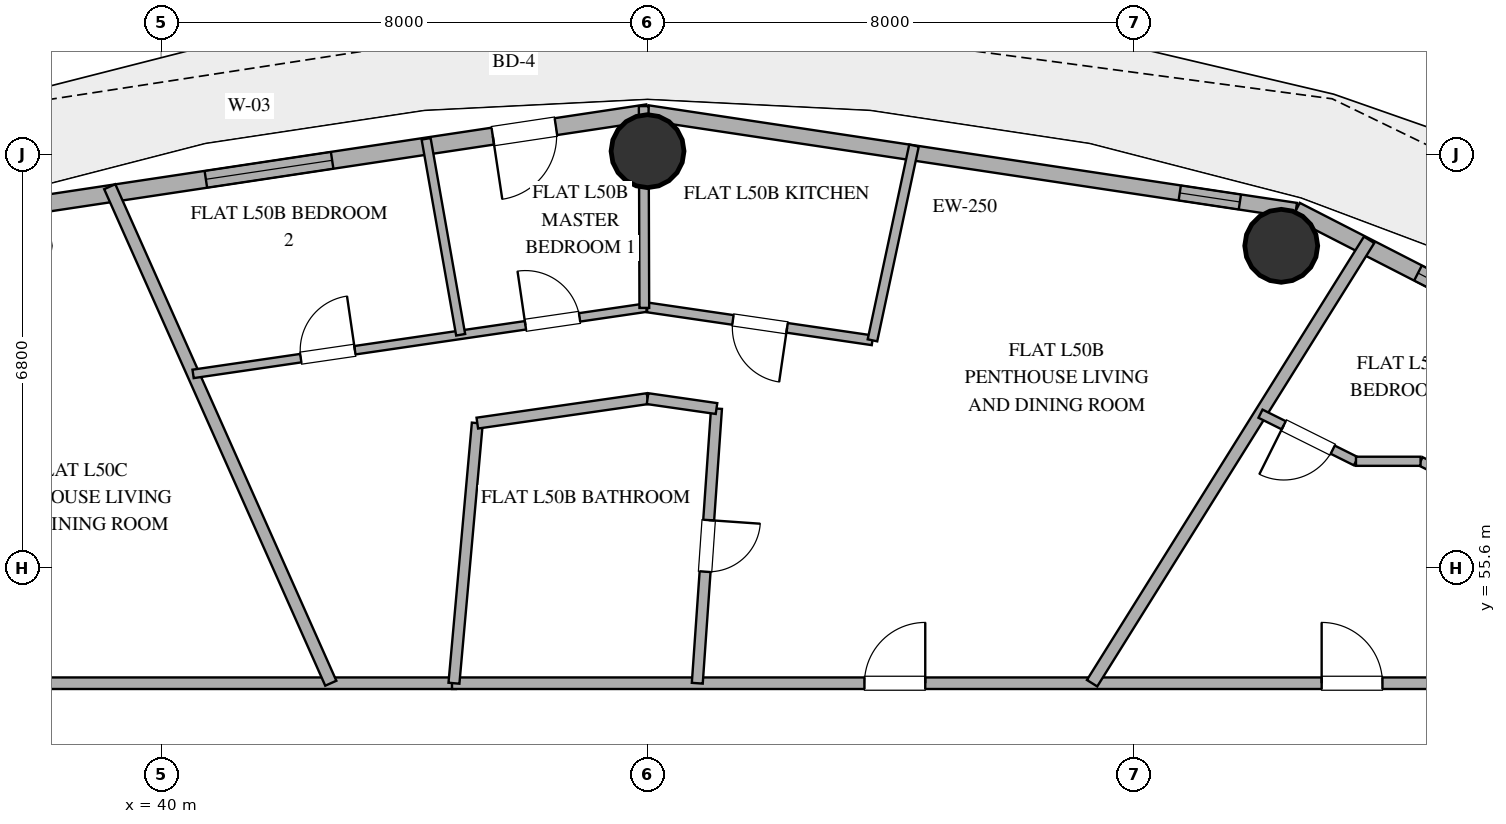
"""IFC4 building model, lengths in metres.
Left out: names, types, materials, properties, quantities, classifications, styles, units other than length and angle.
Written with IfcOpenShell. Run it as: python <this file> out.ifc"""

import sys

from ifc_helpers import new_model, si_unit, direction, frame, frame_2d, origin, origin_2d, place, context, subcontext, project, spatial, rectangle, hollow_circle, extrude, element, fill, save


model = new_model("IFC4")
c1 = context("Model", 3, precision=1e-05, world=origin(), true_north=direction((0.0, 1.0)))
c2 = subcontext(c1, "Body", "Model", "MODEL_VIEW")
j1 = project(units=[si_unit("LENGTHUNIT", "METRE"), si_unit("PLANEANGLEUNIT", "RADIAN")], contexts=[c1])
p1 = place(None, origin())
s1 = spatial("IfcSite", under=j1, at=p1, CompositionType="ELEMENT")
p2 = place(p1, origin())
s2 = spatial("IfcBuilding", under=s1, at=p2, CompositionType="ELEMENT")
p3 = place(p2, frame((0.0, 0.0, 197.4)))
s3 = spatial("IfcBuildingStorey", under=s2, at=p3, CompositionType="ELEMENT", Elevation=197.4)
for number, where, z_axis, x_axis in (
    (1, (58.422, 60.893, 0.0), (0.0, 0.0, 1.0), (1.0, 0.0, 0.0)),
    (2, (48.0, 62.45, 0.0), (0.0, 0.0, 1.0), (1.0, 0.0, 0.0)),
):
    element("IfcColumn", number, at=place(p3, frame(where, z_axis=z_axis, x_axis=x_axis)), inside=s3, PredefinedType="COLUMN", context=c2, shape_type="SweptSolid", body=[
        extrude(hollow_circle(Radius=0.6, WallThickness=0.032, at=origin_2d()), origin(), (0.0, 0.0, 1.0), 3.25),
    ])
p4 = place(p3, frame((67.576, 56.906, 0.0), z_axis=(0.0, 0.0, 1.0), x_axis=(-0.889872523182, 0.456209263919, 0.0)))
e3 = element("IfcWall", 3, at=p4, inside=s3, PredefinedType="SOLIDWALL", context=c2, shape_type="SweptSolid", body=[
    extrude(rectangle(XDim=10.016, YDim=0.28, at=frame_2d((5.008, 0.0))), origin(), (0.0, 0.0, 1.0), 3.25),
])
p5 = place(p4, frame((1.835, 0.0, 0.85)))
e4 = element("IfcOpeningElement", 4, at=p5, cuts=e3, PredefinedType="OPENING", context=c2, shape_type="SweptSolid", body=[
    extrude(rectangle(XDim=1.35, YDim=1.8, at=frame_2d((0.675, 0.9))), frame((0.0, 0.15, 0.0), z_axis=(0.0, -1.0, 0.0), x_axis=(1.0, 0.0, 0.0)), (0.0, 0.0, 1.0), 0.3),
])
p6 = place(p4, frame((4.645, 0.0, 0.85)))
e5 = element("IfcOpeningElement", 5, at=p6, cuts=e3, PredefinedType="OPENING", context=c2, shape_type="SweptSolid", body=[
    extrude(rectangle(XDim=1.2, YDim=1.8, at=frame_2d((0.6, 0.9))), frame((0.0, 0.15, 0.0), z_axis=(0.0, -1.0, 0.0), x_axis=(1.0, 0.0, 0.0)), (0.0, 0.0, 1.0), 0.3),
])
p7 = place(p4, frame((6.559, 0.0, 0.85)))
e6 = element("IfcOpeningElement", 6, at=p7, cuts=e3, PredefinedType="OPENING", context=c2, shape_type="SweptSolid", body=[
    extrude(rectangle(XDim=1.2, YDim=1.8, at=frame_2d((0.6, 0.9))), frame((0.0, 0.15, 0.0), z_axis=(0.0, -1.0, 0.0), x_axis=(1.0, 0.0, 0.0)), (0.0, 0.0, 1.0), 0.3),
])
p8 = place(p3, frame((58.663, 61.475, 0.0), z_axis=(0.0, 0.0, 1.0), x_axis=(-0.988863993413, 0.148822049884, 0.0)))
e7 = element("IfcWall", 7, at=p8, inside=s3, PredefinedType="SOLIDWALL", context=c2, shape_type="SweptSolid", body=[
    extrude(rectangle(XDim=10.783, YDim=0.25, at=frame_2d((5.392, 0.0))), origin(), (0.0, 0.0, 1.0), 3.25),
])
p9 = place(p8, frame((0.932, 0.0, 1.42)))
e8 = element("IfcOpeningElement", 8, at=p9, cuts=e7, PredefinedType="OPENING", context=c2, shape_type="SweptSolid", body=[
    extrude(rectangle(XDim=1.0, YDim=1.05, at=frame_2d((0.5, 0.525))), frame((0.0, 0.135, 0.0), z_axis=(0.0, -1.0, 0.0), x_axis=(1.0, 0.0, 0.0)), (0.0, 0.0, 1.0), 0.27),
])
p10 = place(p3, frame((48.0, 63.08, 0.0), z_axis=(0.0, 0.0, 1.0), x_axis=(-0.988863993413, -0.148822049884, 0.0)))
e9 = element("IfcWall", 9, at=p10, inside=s3, PredefinedType="SOLIDWALL", context=c2, shape_type="SweptSolid", body=[
    extrude(rectangle(XDim=10.783, YDim=0.28, at=frame_2d((5.392, 0.0))), origin(), (0.0, 0.0, 1.0), 3.25),
])
p11 = place(p10, frame((1.524, 0.0, 0.0)))
e10 = element("IfcOpeningElement", 10, at=p11, cuts=e9, PredefinedType="OPENING", context=c2, shape_type="SweptSolid", body=[
    extrude(rectangle(XDim=1.05, YDim=2.2, at=frame_2d((0.525, 1.1))), frame((0.0, 0.15, 0.0), z_axis=(0.0, -1.0, 0.0), x_axis=(1.0, 0.0, 0.0)), (0.0, 0.0, 1.0), 0.3),
])
p12 = place(p10, frame((5.246, 0.0, 0.85)))
e11 = element("IfcOpeningElement", 11, at=p12, cuts=e9, PredefinedType="OPENING", context=c2, shape_type="SweptSolid", body=[
    extrude(rectangle(XDim=2.1, YDim=2.2, at=frame_2d((1.05, 1.1))), frame((0.0, 0.15, 0.0), z_axis=(0.0, -1.0, 0.0), x_axis=(1.0, 0.0, 0.0)), (0.0, 0.0, 1.0), 0.3),
])
p13 = place(p3, frame((32.1, 53.7, 0.0), z_axis=(0.0, 0.0, 1.0), x_axis=(1.0, 0.0, 0.0)))
e12 = element("IfcWall", 12, at=p13, inside=s3, PredefinedType="PARTITIONING", context=c2, shape_type="SweptSolid", body=[
    extrude(rectangle(XDim=12.748, YDim=0.19, at=frame_2d((6.374, 0.0))), origin(), (0.0, 0.0, 1.0), 2.61),
])
p14 = place(p13, frame((4.863, 0.0, 0.0)))
e13 = element("IfcOpeningElement", 13, at=p14, cuts=e12, PredefinedType="OPENING", context=c2, shape_type="SweptSolid", body=[
    extrude(rectangle(XDim=1.0, YDim=2.2, at=frame_2d((0.5, 1.1))), frame((0.0, 0.105, 0.0), z_axis=(0.0, -1.0, 0.0), x_axis=(1.0, 0.0, 0.0)), (0.0, 0.0, 1.0), 0.21),
])
p15 = place(p3, frame((44.784, 53.7, 0.0), z_axis=(0.0, 0.0, 1.0), x_axis=(1.0, 0.0, 0.0)))
e14 = element("IfcWall", 14, at=p15, inside=s3, PredefinedType="PARTITIONING", context=c2, shape_type="SweptSolid", body=[
    extrude(rectangle(XDim=19.116, YDim=0.19, at=frame_2d((9.558, 0.0))), origin(), (0.0, 0.0, 1.0), 2.61),
])
p16 = place(p15, frame((14.302, 0.0, 0.0)))
e15 = element("IfcOpeningElement", 15, at=p16, cuts=e14, PredefinedType="OPENING", context=c2, shape_type="SweptSolid", body=[
    extrude(rectangle(XDim=1.0, YDim=2.2, at=frame_2d((0.5, 1.1))), frame((0.0, 0.105, 0.0), z_axis=(0.0, -1.0, 0.0), x_axis=(1.0, 0.0, 0.0)), (0.0, 0.0, 1.0), 0.21),
])
p17 = place(p15, frame((6.783, 0.0, 0.0)))
e16 = element("IfcOpeningElement", 16, at=p17, cuts=e14, PredefinedType="OPENING", context=c2, shape_type="SweptSolid", body=[
    extrude(rectangle(XDim=1.0, YDim=2.2, at=frame_2d((0.5, 1.1))), frame((0.0, 0.105, 0.0), z_axis=(0.0, -1.0, 0.0), x_axis=(1.0, 0.0, 0.0)), (0.0, 0.0, 1.0), 0.21),
])
p18 = place(p3, frame((42.791, 53.7, 0.0), z_axis=(0.0, 0.0, 1.0), x_axis=(-0.406736436421, 0.913545549651, 0.0)))
e17 = element("IfcWall", 17, at=p18, inside=s3, PredefinedType="PARTITIONING", context=c2, shape_type="SweptSolid", body=[
    extrude(rectangle(XDim=8.939, YDim=0.2, at=frame_2d((4.469, 0.0))), origin(), (0.0, 0.0, 1.0), 2.61),
])
p19 = place(p3, frame((55.311, 53.7, 0.0), z_axis=(0.0, 0.0, 1.0), x_axis=(0.529914717401, 0.848050937315, 0.0)))
e18 = element("IfcWall", 18, at=p19, inside=s3, PredefinedType="PARTITIONING", context=c2, shape_type="SweptSolid", body=[
    extrude(rectangle(XDim=8.599, YDim=0.2, at=frame_2d((4.299, 0.0))), origin(), (0.0, 0.0, 1.0), 2.61),
])
p20 = place(p3, frame((49.134, 58.217, 0.0), z_axis=(0.0, 0.0, 1.0), x_axis=(-0.069767962458, -0.997563246824, 0.0)))
e19 = element("IfcWall", 19, at=p20, inside=s3, PredefinedType="PLUMBINGWALL", context=c2, shape_type="SweptSolid", body=[
    extrude(rectangle(XDim=4.528, YDim=0.18, at=frame_2d((2.264, 0.0))), origin(), (0.0, 0.0, 1.0), 2.61),
])
p21 = place(p20, frame((1.839, 0.0, 0.0)))
e20 = element("IfcOpeningElement", 20, at=p21, cuts=e19, PredefinedType="OPENING", context=c2, shape_type="SweptSolid", body=[
    extrude(rectangle(XDim=0.85, YDim=2.1, at=frame_2d((0.425, 1.05))), frame((0.0, 0.1, 0.0), z_axis=(0.0, -1.0, 0.0), x_axis=(1.0, 0.0, 0.0)), (0.0, 0.0, 1.0), 0.2),
])
p22 = place(p3, frame((40.526, 58.787, 0.0), z_axis=(0.0, 0.0, 1.0), x_axis=(0.989472726968, 0.144719461672, 0.0)))
e21 = element("IfcWall", 21, at=p22, inside=s3, PredefinedType="PARTITIONING", context=c2, shape_type="SweptSolid", body=[
    extrude(rectangle(XDim=7.532, YDim=0.14, at=frame_2d((3.766, 0.0))), origin(), (0.0, 0.0, 1.0), 2.61),
])
p23 = place(p22, frame((1.79, 0.0, 0.0)))
e22 = element("IfcOpeningElement", 22, at=p23, cuts=e21, PredefinedType="OPENING", context=c2, shape_type="SweptSolid", body=[
    extrude(rectangle(XDim=0.9, YDim=2.1, at=frame_2d((0.45, 1.05))), frame((0.0, 0.08, 0.0), z_axis=(0.0, -1.0, 0.0), x_axis=(1.0, 0.0, 0.0)), (0.0, 0.0, 1.0), 0.16),
])
p24 = place(p22, frame((5.524, 0.0, 0.0)))
e23 = element("IfcOpeningElement", 23, at=p24, cuts=e21, PredefinedType="OPENING", context=c2, shape_type="SweptSolid", body=[
    extrude(rectangle(XDim=0.9, YDim=2.1, at=frame_2d((0.45, 1.05))), frame((0.0, 0.08, 0.0), z_axis=(0.0, -1.0, 0.0), x_axis=(1.0, 0.0, 0.0)), (0.0, 0.0, 1.0), 0.16),
])
p25 = place(p3, frame((44.816, 53.7, 0.0), z_axis=(0.0, 0.0, 1.0), x_axis=(0.089418344166, 0.995994156472, 0.0)))
e24 = element("IfcWall", 24, at=p25, inside=s3, PredefinedType="PLUMBINGWALL", context=c2, shape_type="SweptSolid", body=[
    extrude(rectangle(XDim=4.295, YDim=0.18, at=frame_2d((2.147, 0.0))), origin(), (0.0, 0.0, 1.0), 2.61),
])
p26 = place(p3, frame((51.699, 59.339, 0.0), z_axis=(0.0, 0.0, 1.0), x_axis=(-0.98948182168, 0.144657265858, 0.0)))
e25 = element("IfcWall", 25, at=p26, inside=s3, PredefinedType="PLUMBINGWALL", context=c2, shape_type="SweptSolid", body=[
    extrude(rectangle(XDim=3.738, YDim=0.16, at=frame_2d((1.869, 0.0))), origin(), (0.0, 0.0, 1.0), 2.61),
])
p27 = place(p26, frame((1.419, 0.0, 0.0)))
e26 = element("IfcOpeningElement", 26, at=p27, cuts=e25, PredefinedType="OPENING", context=c2, shape_type="SweptSolid", body=[
    extrude(rectangle(XDim=0.9, YDim=2.1, at=frame_2d((0.45, 1.05))), frame((0.0, 0.09, 0.0), z_axis=(0.0, -1.0, 0.0), x_axis=(1.0, 0.0, 0.0)), (0.0, 0.0, 1.0), 0.18),
])
p28 = place(p3, frame((47.947, 59.872, 0.0), z_axis=(0.0, 0.0, 1.0), x_axis=(-0.003016466559, 0.999995450454, 0.0)))
e27 = element("IfcWall", 27, at=p28, inside=s3, PredefinedType="PLUMBINGWALL", context=c2, shape_type="SweptSolid", body=[
    extrude(rectangle(XDim=3.318, YDim=0.16, at=frame_2d((1.659, 0.0))), origin(), (0.0, 0.0, 1.0), 2.61),
])
p29 = place(p3, frame((52.382, 62.542, 0.0), z_axis=(0.0, 0.0, 1.0), x_axis=(-0.208602341862, -0.97800054344, 0.0)))
e28 = element("IfcWall", 28, at=p29, inside=s3, PredefinedType="PLUMBINGWALL", context=c2, shape_type="SweptSolid", body=[
    extrude(rectangle(XDim=3.275, YDim=0.16, at=frame_2d((1.637, 0.0))), origin(), (0.0, 0.0, 1.0), 2.61),
])
p30 = place(p3, frame((44.927, 59.43, 0.0), z_axis=(0.0, 0.0, 1.0), x_axis=(-0.17359807558, 0.984816586048, 0.0)))
e29 = element("IfcWall", 29, at=p30, inside=s3, PredefinedType="PARTITIONING", context=c2, shape_type="SweptSolid", body=[
    extrude(rectangle(XDim=3.273, YDim=0.15, at=frame_2d((1.636, 0.0))), origin(), (0.0, 0.0, 1.0), 2.61),
])
p31 = place(p3, frame((45.2, 57.978, 0.0), z_axis=(0.0, 0.0, 1.0), x_axis=(0.98983176764, 0.142243002535, 0.0)))
e30 = element("IfcWall", 30, at=p31, inside=s3, PredefinedType="PLUMBINGWALL", context=c2, shape_type="SweptSolid", body=[
    extrude(rectangle(XDim=2.829, YDim=0.18, at=frame_2d((1.414, 0.0))), origin(), (0.0, 0.0, 1.0), 2.61),
])
p32 = place(p3, frame((59.651, 57.35, 0.0), z_axis=(0.0, 0.0, 1.0), x_axis=(-0.895038630404, 0.445988621027, 0.0)))
e31 = element("IfcWall", 31, at=p32, inside=s3, PredefinedType="PARTITIONING", context=c2, shape_type="SweptSolid", body=[
    extrude(rectangle(XDim=1.754, YDim=0.15, at=frame_2d((0.877, 0.0))), origin(), (0.0, 0.0, 1.0), 2.61),
])
p33 = place(p32, frame((0.427, 0.0, 0.0)))
e32 = element("IfcOpeningElement", 32, at=p33, cuts=e31, PredefinedType="OPENING", context=c2, shape_type="SweptSolid", body=[
    extrude(rectangle(XDim=0.9, YDim=2.1, at=frame_2d((0.45, 1.05))), frame((0.0, 0.085, 0.0), z_axis=(0.0, -1.0, 0.0), x_axis=(1.0, 0.0, 0.0)), (0.0, 0.0, 1.0), 0.17),
])
p34 = place(p3, frame((62.278, 56.57, 0.0), z_axis=(0.0, 0.0, 1.0), x_axis=(-0.894929238491, 0.446208088333, 0.0)))
e33 = element("IfcWall", 33, at=p34, inside=s3, PredefinedType="PARTITIONING", context=c2, shape_type="SweptSolid", body=[
    extrude(rectangle(XDim=1.749, YDim=0.15, at=frame_2d((0.875, 0.0))), origin(), (0.0, 0.0, 1.0), 2.61),
])
p35 = place(p3, frame((48.0, 58.38, 0.0), z_axis=(0.0, 0.0, 1.0), x_axis=(0.989846946984, -0.142137333399, 0.0)))
e34 = element("IfcWall", 34, at=p35, inside=s3, PredefinedType="PLUMBINGWALL", context=c2, shape_type="SweptSolid", body=[
    extrude(rectangle(XDim=1.146, YDim=0.18, at=frame_2d((0.573, 0.0))), origin(), (0.0, 0.0, 1.0), 2.61),
])
p36 = place(p3, frame((60.713, 57.35, 0.0), z_axis=(0.0, 0.0, 1.0), x_axis=(-1.0, 0.0, 0.0)))
e35 = element("IfcWall", 35, at=p36, inside=s3, PredefinedType="PARTITIONING", context=c2, shape_type="SweptSolid", body=[
    extrude(rectangle(XDim=1.062, YDim=0.15, at=frame_2d((0.531, 0.0))), origin(), (0.0, 0.0, 1.0), 2.61),
])
p37 = place(p7, origin())
e36 = element("IfcWindow", 36, at=p37, inside=s3, PartitioningType="SINGLE_PANEL", PredefinedType="WINDOW", context=c2, shape_type="SweptSolid", body=[
    extrude(rectangle(XDim=1.2, YDim=1.8, at=frame_2d((0.6, 0.9))), frame((0.0, 0.03, 0.0), z_axis=(0.0, -1.0, 0.0), x_axis=(1.0, 0.0, 0.0)), (0.0, 0.0, 1.0), 0.06),
])
fill(e6, e36)
p38 = place(p11, origin())
e37 = element("IfcDoor", 37, at=p38, inside=s3, OperationType="SINGLE_SWING_RIGHT", PredefinedType="DOOR", context=c2, shape_type="SweptSolid", body=[
    extrude(rectangle(XDim=1.05, YDim=2.2, at=frame_2d((0.525, 1.1))), frame((0.0, 0.025, 0.0), z_axis=(0.0, -1.0, 0.0), x_axis=(1.0, 0.0, 0.0)), (0.0, 0.0, 1.0), 0.05),
])
fill(e10, e37)
p39 = place(p12, origin())
e38 = element("IfcWindow", 38, at=p39, inside=s3, PartitioningType="SINGLE_PANEL", PredefinedType="WINDOW", context=c2, shape_type="SweptSolid", body=[
    extrude(rectangle(XDim=2.1, YDim=2.2, at=frame_2d((1.05, 1.1))), frame((0.0, 0.03, 0.0), z_axis=(0.0, -1.0, 0.0), x_axis=(1.0, 0.0, 0.0)), (0.0, 0.0, 1.0), 0.06),
])
fill(e11, e38)
p40 = place(p9, origin())
e39 = element("IfcWindow", 39, at=p40, inside=s3, PartitioningType="SINGLE_PANEL", PredefinedType="WINDOW", context=c2, shape_type="SweptSolid", body=[
    extrude(rectangle(XDim=1.0, YDim=1.05, at=frame_2d((0.5, 0.525))), frame((0.0, 0.03, 0.0), z_axis=(0.0, -1.0, 0.0), x_axis=(1.0, 0.0, 0.0)), (0.0, 0.0, 1.0), 0.06),
])
fill(e8, e39)
p41 = place(p16, origin())
e40 = element("IfcDoor", 40, at=p41, inside=s3, OperationType="SINGLE_SWING_LEFT", PredefinedType="DOOR", context=c2, shape_type="SweptSolid", body=[
    extrude(rectangle(XDim=1.0, YDim=2.2, at=frame_2d((0.5, 1.1))), frame((0.0, 0.025, 0.0), z_axis=(0.0, -1.0, 0.0), x_axis=(1.0, 0.0, 0.0)), (0.0, 0.0, 1.0), 0.05),
])
fill(e15, e40)
p42 = place(p17, origin())
e41 = element("IfcDoor", 41, at=p42, inside=s3, OperationType="SINGLE_SWING_RIGHT", PredefinedType="DOOR", context=c2, shape_type="SweptSolid", body=[
    extrude(rectangle(XDim=1.0, YDim=2.2, at=frame_2d((0.5, 1.1))), frame((0.0, 0.025, 0.0), z_axis=(0.0, -1.0, 0.0), x_axis=(1.0, 0.0, 0.0)), (0.0, 0.0, 1.0), 0.05),
])
fill(e16, e41)
p43 = place(p21, origin())
e42 = element("IfcDoor", 42, at=p43, inside=s3, OperationType="SINGLE_SWING_LEFT", PredefinedType="DOOR", context=c2, shape_type="SweptSolid", body=[
    extrude(rectangle(XDim=0.85, YDim=2.1, at=frame_2d((0.425, 1.05))), frame((0.0, 0.025, 0.0), z_axis=(0.0, -1.0, 0.0), x_axis=(1.0, 0.0, 0.0)), (0.0, 0.0, 1.0), 0.05),
])
fill(e20, e42)
p44 = place(p23, origin())
e43 = element("IfcDoor", 43, at=p44, inside=s3, OperationType="SINGLE_SWING_RIGHT", PredefinedType="DOOR", context=c2, shape_type="SweptSolid", body=[
    extrude(rectangle(XDim=0.9, YDim=2.1, at=frame_2d((0.45, 1.05))), frame((0.0, 0.025, 0.0), z_axis=(0.0, -1.0, 0.0), x_axis=(1.0, 0.0, 0.0)), (0.0, 0.0, 1.0), 0.05),
])
fill(e22, e43)
p45 = place(p24, origin())
e44 = element("IfcDoor", 44, at=p45, inside=s3, OperationType="SINGLE_SWING_LEFT", PredefinedType="DOOR", context=c2, shape_type="SweptSolid", body=[
    extrude(rectangle(XDim=0.9, YDim=2.1, at=frame_2d((0.45, 1.05))), frame((0.0, 0.025, 0.0), z_axis=(0.0, -1.0, 0.0), x_axis=(1.0, 0.0, 0.0)), (0.0, 0.0, 1.0), 0.05),
])
fill(e23, e44)
p46 = place(p27, origin())
e45 = element("IfcDoor", 45, at=p46, inside=s3, OperationType="SINGLE_SWING_LEFT", PredefinedType="DOOR", context=c2, shape_type="SweptSolid", body=[
    extrude(rectangle(XDim=0.9, YDim=2.1, at=frame_2d((0.45, 1.05))), frame((0.0, 0.025, 0.0), z_axis=(0.0, -1.0, 0.0), x_axis=(1.0, 0.0, 0.0)), (0.0, 0.0, 1.0), 0.05),
])
fill(e26, e45)
p47 = place(p33, origin())
e46 = element("IfcDoor", 46, at=p47, inside=s3, OperationType="SINGLE_SWING_RIGHT", PredefinedType="DOOR", context=c2, shape_type="SweptSolid", body=[
    extrude(rectangle(XDim=0.9, YDim=2.1, at=frame_2d((0.45, 1.05))), frame((0.0, 0.025, 0.0), z_axis=(0.0, -1.0, 0.0), x_axis=(1.0, 0.0, 0.0)), (0.0, 0.0, 1.0), 0.05),
])
fill(e32, e46)
save(model, sys.argv[1])
